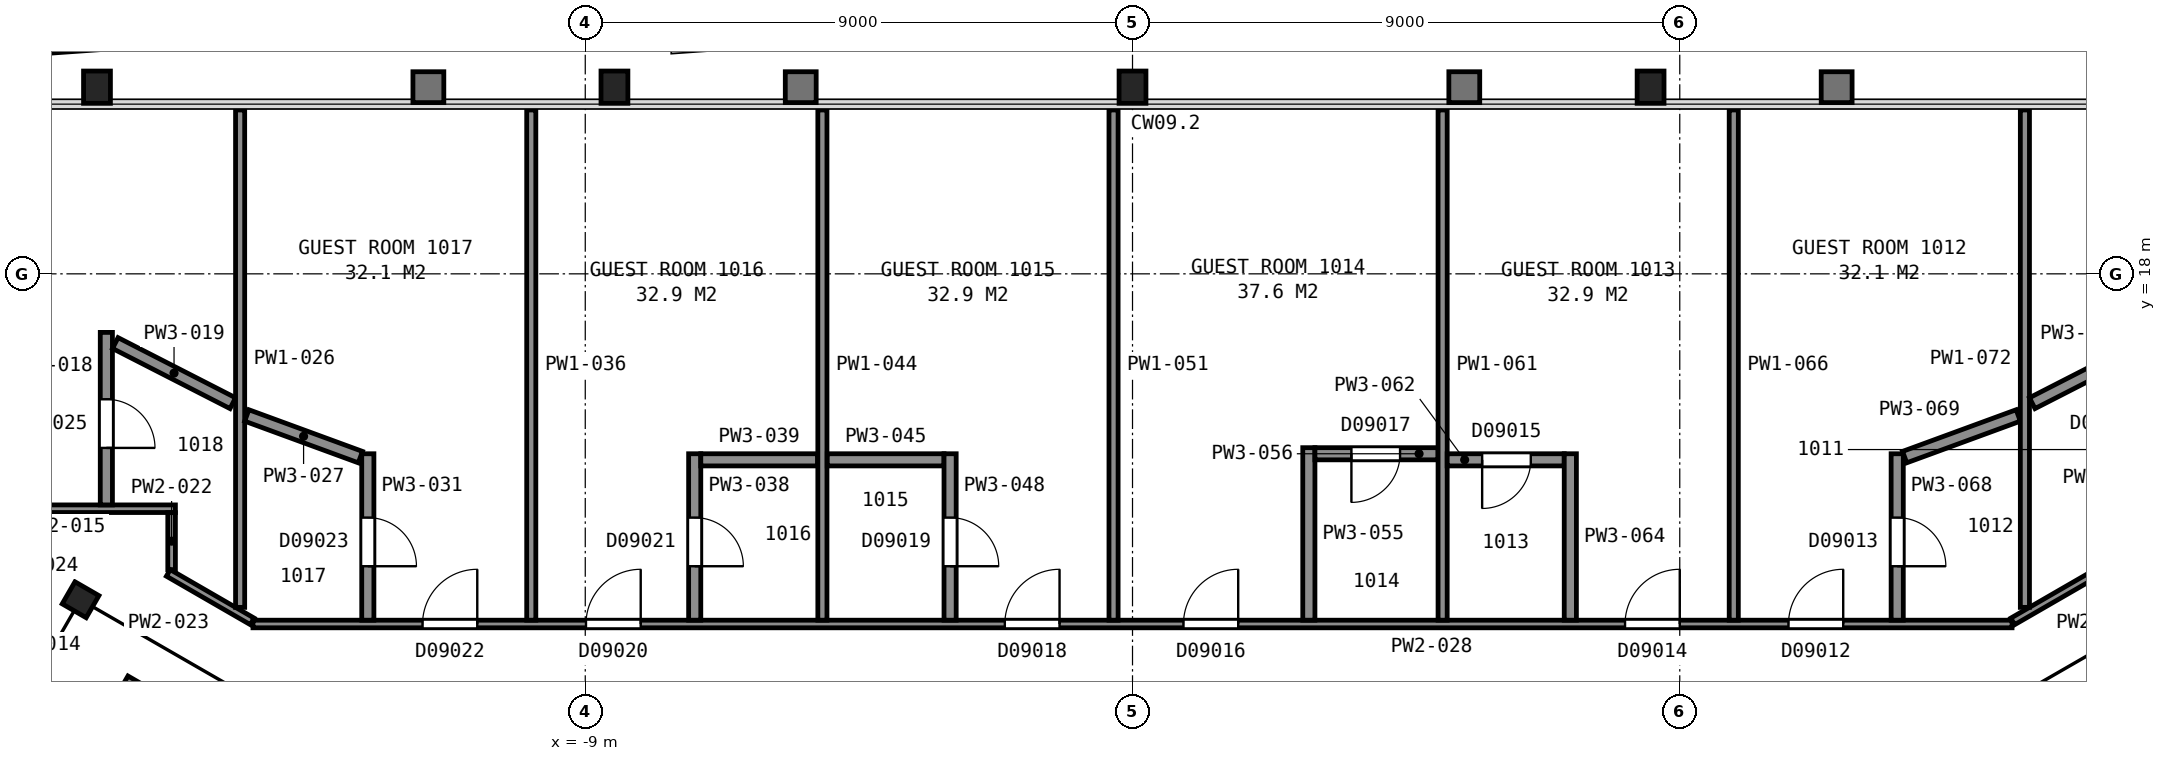
"""IFC4 building model, lengths in metres.
Left out: names, types, materials, properties, quantities, classifications, styles, units other than length and angle.
Written with IfcOpenShell. Run it as: python <this file> out.ifc"""

import sys

from ifc_helpers import new_model, si_unit, direction, frame, frame_2d, origin, origin_2d, place, context, subcontext, project, spatial, rectangle, i_section, extrude, element, fill, save


model = new_model("IFC4")
c1 = context("Model", 3, precision=1e-05, world=origin(), true_north=direction((0.0, 1.0)))
c2 = subcontext(c1, "Body", "Model", "MODEL_VIEW")
j1 = project(units=[si_unit("LENGTHUNIT", "METRE"), si_unit("PLANEANGLEUNIT", "RADIAN")], contexts=[c1])
p1 = place(None, origin())
s1 = spatial("IfcSite", under=j1, at=p1, CompositionType="ELEMENT")
p2 = place(p1, origin())
s2 = spatial("IfcBuilding", under=s1, at=p2, CompositionType="ELEMENT")
p3 = place(p2, frame((0.0, 0.0, 51.2)))
s3 = spatial("IfcBuildingStorey", under=s2, at=p3, CompositionType="ELEMENT", Elevation=51.2)
for number, where, z_axis, x_axis in (
    (1, (8.52, 21.07, 0.0), (0.0, 0.0, 1.0), (1.0, 0.0, 0.0)),
    (2, (0.0, 21.07, 0.0), (0.0, 0.0, 1.0), (1.0, 0.0, 0.0)),
    (3, (-8.52, 21.07, 0.0), (0.0, 0.0, 1.0), (1.0, 0.0, 0.0)),
    (4, (-17.03, 21.07, 0.0), (0.0, 0.0, 1.0), (1.0, 0.0, 0.0)),
):
    element("IfcColumn", number, at=place(p3, frame(where, z_axis=z_axis, x_axis=x_axis)), inside=s3, PredefinedType="COLUMN", context=c2, shape_type="SweptSolid", body=[
        extrude(i_section(OverallWidth=0.442, OverallDepth=0.531, WebThickness=0.066, FlangeThickness=0.106, FilletRadius=0.015, at=origin_2d()), origin(), (0.0, 0.0, 1.0), 3.6),
    ])
p4 = place(p3, frame((-17.3, 12.64, 0.0), z_axis=(0.0, 0.0, 1.0), x_axis=(0.5, 0.866025403784, 0.0)))
e5 = element("IfcColumn", 5, at=p4, inside=s3, PredefinedType="COLUMN", context=c2, shape_type="SweptSolid", body=[
    extrude(i_section(OverallWidth=0.419, OverallDepth=0.455, WebThickness=0.042, FlangeThickness=0.068, FilletRadius=0.015, at=origin_2d()), origin(), (0.0, 0.0, 1.0), 3.6),
])
for number, where, z_axis, x_axis in (
    (6, (6.178, 5.299, 0.0), (0.0, 0.0, 1.0), (0.866, 0.5, 0.0)),
    (7, (-6.178, 5.299, 0.0), (0.0, 0.0, 1.0), (-0.866, 0.5, 0.0)),
):
    element("IfcWall", number, at=place(p3, frame(where, z_axis=z_axis, x_axis=x_axis)), inside=s3, PredefinedType="PARTITIONING", context=c2, shape_type="SweptSolid", body=[
        extrude(rectangle(XDim=12.0, YDim=0.2, at=frame_2d((6.0, 0.0))), origin(), (0.0, 0.0, 1.0), 3.35),
    ])
p5 = place(p3, frame((-18.86, 14.137, 0.0), z_axis=(0.0, 0.0, 1.0), x_axis=(1.0, 0.0, 0.0)))
e8 = element("IfcWall", 8, at=p5, inside=s3, PredefinedType="PARTITIONING", context=c2, shape_type="SweptSolid", body=[
    extrude(rectangle(XDim=3.119, YDim=0.125, at=frame_2d((1.56, 0.0))), origin(), (0.0, 0.0, 1.0), 2.613),
])
p6 = place(p3, frame((-16.876, 17.037, 0.0), z_axis=(0.0, 0.0, 1.0), x_axis=(0.0, -1.0, 0.0)))
e9 = element("IfcWall", 9, at=p6, inside=s3, PredefinedType="PARTITIONING", context=c2, shape_type="SweptSolid", body=[
    extrude(rectangle(XDim=2.838, YDim=0.2, at=frame_2d((1.419, 0.0))), origin(), (0.0, 0.0, 1.0), 2.613),
])
p7 = place(p6, frame((1.1, 0.0, 0.0)))
e10 = element("IfcOpeningElement", 10, at=p7, cuts=e9, PredefinedType="OPENING", context=c2, shape_type="SweptSolid", body=[
    extrude(rectangle(XDim=0.8, YDim=2.1, at=frame_2d((0.4, 1.05))), frame((0.0, 0.11, 0.0), z_axis=(0.0, -1.0, 0.0), x_axis=(1.0, 0.0, 0.0)), (0.0, 0.0, 1.0), 0.22),
])
p8 = place(p3, frame((-16.729, 16.862, 0.0), z_axis=(0.0, 0.0, 1.0), x_axis=(0.890181338078, -0.455606392995, 0.0)))
e11 = element("IfcWall", 11, at=p8, inside=s3, PredefinedType="PARTITIONING", context=c2, shape_type="SweptSolid", body=[
    extrude(rectangle(XDim=2.171, YDim=0.2, at=frame_2d((1.085, 0.0))), origin(), (0.0, 0.0, 1.0), 2.613),
])
p9 = place(p3, frame((-15.803, 13.135, 0.0), z_axis=(0.0, 0.0, 1.0), x_axis=(0.0, 1.0, 0.0)))
e12 = element("IfcWall", 12, at=p9, inside=s3, PredefinedType="PARTITIONING", context=c2, shape_type="SweptSolid", body=[
    extrude(rectangle(XDim=0.937, YDim=0.125, at=frame_2d((0.469, 0.0))), origin(), (0.0, 0.0, 1.0), 2.613),
])
p10 = place(p3, frame((-15.857, 13.081, 0.0), z_axis=(0.0, 0.0, 1.0), x_axis=(0.865974057503, -0.500088923824, 0.0)))
e13 = element("IfcWall", 13, at=p10, inside=s3, PredefinedType="PARTITIONING", context=c2, shape_type="SweptSolid", body=[
    extrude(rectangle(XDim=1.595, YDim=0.125, at=frame_2d((0.798, 0.0))), origin(), (0.0, 0.0, 1.0), 2.613),
])
p11 = place(p3, frame((-14.676, 12.514, 0.0), z_axis=(0.0, 0.0, 1.0), x_axis=(0.0, 1.0, 0.0)))
e14 = element("IfcWall", 14, at=p11, inside=s3, PredefinedType="PARTITIONING", context=c2, shape_type="SweptSolid", body=[
    extrude(rectangle(XDim=8.181, YDim=0.15, at=frame_2d((4.09, 0.0))), origin(), (0.0, 0.0, 1.0), 2.613),
])
p12 = place(p3, frame((-14.567, 15.671, 0.0), z_axis=(0.0, 0.0, 1.0), x_axis=(0.938894816734, -0.344204188105, 0.0)))
e15 = element("IfcWall", 15, at=p12, inside=s3, PredefinedType="PARTITIONING", context=c2, shape_type="SweptSolid", body=[
    extrude(rectangle(XDim=1.99, YDim=0.2, at=frame_2d((0.995, 0.0))), origin(), (0.0, 0.0, 1.0), 2.613),
])
p13 = place(p3, frame((-14.465, 12.241, 0.0), z_axis=(0.0, 0.0, 1.0), x_axis=(1.0, 0.0, 0.0)))
e16 = element("IfcWall", 16, at=p13, inside=s3, PredefinedType="PARTITIONING", context=c2, shape_type="SweptSolid", body=[
    extrude(rectangle(XDim=28.929, YDim=0.125, at=frame_2d((14.465, 0.0))), origin(), (0.0, 0.0, 1.0), 2.613),
])
p14 = place(p13, frame((25.252, 0.0, 0.0)))
e17 = element("IfcOpeningElement", 17, at=p14, cuts=e16, PredefinedType="OPENING", context=c2, shape_type="SweptSolid", body=[
    extrude(rectangle(XDim=0.9, YDim=2.1, at=frame_2d((0.45, 1.05))), frame((0.0, 0.073, 0.0), z_axis=(0.0, -1.0, 0.0), x_axis=(1.0, 0.0, 0.0)), (0.0, 0.0, 1.0), 0.145),
])
p15 = place(p13, frame((22.564, 0.0, 0.0)))
e18 = element("IfcOpeningElement", 18, at=p15, cuts=e16, PredefinedType="OPENING", context=c2, shape_type="SweptSolid", body=[
    extrude(rectangle(XDim=0.9, YDim=2.1, at=frame_2d((0.45, 1.05))), frame((0.0, 0.073, 0.0), z_axis=(0.0, -1.0, 0.0), x_axis=(1.0, 0.0, 0.0)), (0.0, 0.0, 1.0), 0.145),
])
p16 = place(p13, frame((15.302, 0.0, 0.0)))
e19 = element("IfcOpeningElement", 19, at=p16, cuts=e16, PredefinedType="OPENING", context=c2, shape_type="SweptSolid", body=[
    extrude(rectangle(XDim=0.9, YDim=2.1, at=frame_2d((0.45, 1.05))), frame((0.0, 0.073, 0.0), z_axis=(0.0, -1.0, 0.0), x_axis=(1.0, 0.0, 0.0)), (0.0, 0.0, 1.0), 0.145),
])
p17 = place(p13, frame((12.365, 0.0, 0.0)))
e20 = element("IfcOpeningElement", 20, at=p17, cuts=e16, PredefinedType="OPENING", context=c2, shape_type="SweptSolid", body=[
    extrude(rectangle(XDim=0.9, YDim=2.1, at=frame_2d((0.45, 1.05))), frame((0.0, 0.073, 0.0), z_axis=(0.0, -1.0, 0.0), x_axis=(1.0, 0.0, 0.0)), (0.0, 0.0, 1.0), 0.145),
])
p18 = place(p13, frame((5.477, 0.0, 0.0)))
e21 = element("IfcOpeningElement", 21, at=p18, cuts=e16, PredefinedType="OPENING", context=c2, shape_type="SweptSolid", body=[
    extrude(rectangle(XDim=0.9, YDim=2.1, at=frame_2d((0.45, 1.05))), frame((0.0, 0.073, 0.0), z_axis=(0.0, -1.0, 0.0), x_axis=(1.0, 0.0, 0.0)), (0.0, 0.0, 1.0), 0.145),
])
p19 = place(p13, frame((2.789, 0.0, 0.0)))
e22 = element("IfcOpeningElement", 22, at=p19, cuts=e16, PredefinedType="OPENING", context=c2, shape_type="SweptSolid", body=[
    extrude(rectangle(XDim=0.9, YDim=2.1, at=frame_2d((0.45, 1.05))), frame((0.0, 0.073, 0.0), z_axis=(0.0, -1.0, 0.0), x_axis=(1.0, 0.0, 0.0)), (0.0, 0.0, 1.0), 0.145),
])
p20 = place(p3, frame((-12.576, 12.303, 0.0), z_axis=(0.0, 0.0, 1.0), x_axis=(0.0, 1.0, 0.0)))
e23 = element("IfcWall", 23, at=p20, inside=s3, PredefinedType="PARTITIONING", context=c2, shape_type="SweptSolid", body=[
    extrude(rectangle(XDim=2.738, YDim=0.2, at=frame_2d((1.369, 0.0))), origin(), (0.0, 0.0, 1.0), 2.613),
])
p21 = place(p20, frame((0.887, 0.0, 0.0)))
e24 = element("IfcOpeningElement", 24, at=p21, cuts=e23, PredefinedType="OPENING", context=c2, shape_type="SweptSolid", body=[
    extrude(rectangle(XDim=0.8, YDim=2.1, at=frame_2d((0.4, 1.05))), frame((0.0, 0.11, 0.0), z_axis=(0.0, -1.0, 0.0), x_axis=(1.0, 0.0, 0.0)), (0.0, 0.0, 1.0), 0.22),
])
p22 = place(p3, frame((-9.888, 12.303, 0.0), z_axis=(0.0, 0.0, 1.0), x_axis=(0.0, 1.0, 0.0)))
e25 = element("IfcWall", 25, at=p22, inside=s3, PredefinedType="PARTITIONING", context=c2, shape_type="SweptSolid", body=[
    extrude(rectangle(XDim=8.392, YDim=0.15, at=frame_2d((4.196, 0.0))), origin(), (0.0, 0.0, 1.0), 2.613),
])
p23 = place(p3, frame((-7.2, 15.041, 0.0), z_axis=(0.0, 0.0, 1.0), x_axis=(0.0, -1.0, 0.0)))
e26 = element("IfcWall", 26, at=p23, inside=s3, PredefinedType="PARTITIONING", context=c2, shape_type="SweptSolid", body=[
    extrude(rectangle(XDim=2.738, YDim=0.2, at=frame_2d((1.369, 0.0))), origin(), (0.0, 0.0, 1.0), 2.613),
])
p24 = place(p23, frame((1.05, 0.0, 0.0)))
e27 = element("IfcOpeningElement", 27, at=p24, cuts=e26, PredefinedType="OPENING", context=c2, shape_type="SweptSolid", body=[
    extrude(rectangle(XDim=0.8, YDim=2.1, at=frame_2d((0.4, 1.05))), frame((0.0, 0.11, 0.0), z_axis=(0.0, -1.0, 0.0), x_axis=(1.0, 0.0, 0.0)), (0.0, 0.0, 1.0), 0.22),
])
p25 = place(p3, frame((-7.1, 14.941, 0.0), z_axis=(0.0, 0.0, 1.0), x_axis=(1.0, 0.0, 0.0)))
e28 = element("IfcWall", 28, at=p25, inside=s3, PredefinedType="PARTITIONING", context=c2, shape_type="SweptSolid", body=[
    extrude(rectangle(XDim=1.92, YDim=0.2, at=frame_2d((0.96, 0.0))), origin(), (0.0, 0.0, 1.0), 2.613),
])
p26 = place(p3, frame((-5.1, 12.303, 0.0), z_axis=(0.0, 0.0, 1.0), x_axis=(0.0, 1.0, 0.0)))
e29 = element("IfcWall", 29, at=p26, inside=s3, PredefinedType="PARTITIONING", context=c2, shape_type="SweptSolid", body=[
    extrude(rectangle(XDim=8.392, YDim=0.15, at=frame_2d((4.196, 0.0))), origin(), (0.0, 0.0, 1.0), 2.613),
])
p27 = place(p3, frame((-5.02, 14.941, 0.0), z_axis=(0.0, 0.0, 1.0), x_axis=(1.0, 0.0, 0.0)))
e30 = element("IfcWall", 30, at=p27, inside=s3, PredefinedType="PARTITIONING", context=c2, shape_type="SweptSolid", body=[
    extrude(rectangle(XDim=1.92, YDim=0.2, at=frame_2d((0.96, 0.0))), origin(), (0.0, 0.0, 1.0), 2.613),
])
p28 = place(p3, frame((-3.0, 12.303, 0.0), z_axis=(0.0, 0.0, 1.0), x_axis=(0.0, 1.0, 0.0)))
e31 = element("IfcWall", 31, at=p28, inside=s3, PredefinedType="PARTITIONING", context=c2, shape_type="SweptSolid", body=[
    extrude(rectangle(XDim=2.738, YDim=0.2, at=frame_2d((1.369, 0.0))), origin(), (0.0, 0.0, 1.0), 2.613),
])
p29 = place(p28, frame((0.887, 0.0, 0.0)))
e32 = element("IfcOpeningElement", 32, at=p29, cuts=e31, PredefinedType="OPENING", context=c2, shape_type="SweptSolid", body=[
    extrude(rectangle(XDim=0.8, YDim=2.1, at=frame_2d((0.4, 1.05))), frame((0.0, 0.11, 0.0), z_axis=(0.0, -1.0, 0.0), x_axis=(1.0, 0.0, 0.0)), (0.0, 0.0, 1.0), 0.22),
])
p30 = place(p3, frame((-0.312, 12.303, 0.0), z_axis=(0.0, 0.0, 1.0), x_axis=(0.0, 1.0, 0.0)))
e33 = element("IfcWall", 33, at=p30, inside=s3, PredefinedType="PARTITIONING", context=c2, shape_type="SweptSolid", body=[
    extrude(rectangle(XDim=8.392, YDim=0.15, at=frame_2d((4.196, 0.0))), origin(), (0.0, 0.0, 1.0), 2.613),
])
p31 = place(p3, frame((2.9, 12.303, 0.0), z_axis=(0.0, 0.0, 1.0), x_axis=(0.0, 1.0, 0.0)))
e34 = element("IfcWall", 34, at=p31, inside=s3, PredefinedType="PARTITIONING", context=c2, shape_type="SweptSolid", body=[
    extrude(rectangle(XDim=2.838, YDim=0.2, at=frame_2d((1.419, 0.0))), origin(), (0.0, 0.0, 1.0), 2.613),
])
p32 = place(p3, frame((5.025, 15.041, 0.0), z_axis=(0.0, 0.0, 1.0), x_axis=(-1.0, 0.0, 0.0)))
e35 = element("IfcWall", 35, at=p32, inside=s3, PredefinedType="PARTITIONING", context=c2, shape_type="SweptSolid", body=[
    extrude(rectangle(XDim=2.025, YDim=0.2, at=frame_2d((1.012, 0.0))), origin(), (0.0, 0.0, 1.0), 2.613),
])
p33 = place(p32, frame((0.625, 0.0, 0.0)))
e36 = element("IfcOpeningElement", 36, at=p33, cuts=e35, PredefinedType="OPENING", context=c2, shape_type="SweptSolid", body=[
    extrude(rectangle(XDim=0.8, YDim=2.1, at=frame_2d((0.4, 1.05))), frame((0.0, 0.11, 0.0), z_axis=(0.0, -1.0, 0.0), x_axis=(1.0, 0.0, 0.0)), (0.0, 0.0, 1.0), 0.22),
])
p34 = place(p3, frame((5.1, 12.303, 0.0), z_axis=(0.0, 0.0, 1.0), x_axis=(0.0, 1.0, 0.0)))
e37 = element("IfcWall", 37, at=p34, inside=s3, PredefinedType="PARTITIONING", context=c2, shape_type="SweptSolid", body=[
    extrude(rectangle(XDim=8.392, YDim=0.15, at=frame_2d((4.196, 0.0))), origin(), (0.0, 0.0, 1.0), 2.613),
])
p35 = place(p3, frame((7.1, 14.941, 0.0), z_axis=(0.0, 0.0, 1.0), x_axis=(-1.0, 0.0, 0.0)))
e38 = element("IfcWall", 38, at=p35, inside=s3, PredefinedType="PARTITIONING", context=c2, shape_type="SweptSolid", body=[
    extrude(rectangle(XDim=1.925, YDim=0.2, at=frame_2d((0.962, 0.0))), origin(), (0.0, 0.0, 1.0), 2.613),
])
p36 = place(p35, frame((0.55, 0.0, 0.0)))
e39 = element("IfcOpeningElement", 39, at=p36, cuts=e38, PredefinedType="OPENING", context=c2, shape_type="SweptSolid", body=[
    extrude(rectangle(XDim=0.8, YDim=2.1, at=frame_2d((0.4, 1.05))), frame((0.0, 0.11, 0.0), z_axis=(0.0, -1.0, 0.0), x_axis=(1.0, 0.0, 0.0)), (0.0, 0.0, 1.0), 0.22),
])
p37 = place(p3, frame((7.2, 12.303, 0.0), z_axis=(0.0, 0.0, 1.0), x_axis=(0.0, 1.0, 0.0)))
e40 = element("IfcWall", 40, at=p37, inside=s3, PredefinedType="PARTITIONING", context=c2, shape_type="SweptSolid", body=[
    extrude(rectangle(XDim=2.738, YDim=0.2, at=frame_2d((1.369, 0.0))), origin(), (0.0, 0.0, 1.0), 2.613),
])
p38 = place(p3, frame((9.888, 12.303, 0.0), z_axis=(0.0, 0.0, 1.0), x_axis=(0.0, 1.0, 0.0)))
e41 = element("IfcWall", 41, at=p38, inside=s3, PredefinedType="PARTITIONING", context=c2, shape_type="SweptSolid", body=[
    extrude(rectangle(XDim=8.392, YDim=0.15, at=frame_2d((4.196, 0.0))), origin(), (0.0, 0.0, 1.0), 2.613),
])
p39 = place(p3, frame((12.576, 15.041, 0.0), z_axis=(0.0, 0.0, 1.0), x_axis=(0.0, -1.0, 0.0)))
e42 = element("IfcWall", 42, at=p39, inside=s3, PredefinedType="PARTITIONING", context=c2, shape_type="SweptSolid", body=[
    extrude(rectangle(XDim=2.738, YDim=0.2, at=frame_2d((1.369, 0.0))), origin(), (0.0, 0.0, 1.0), 2.613),
])
p40 = place(p39, frame((1.05, 0.0, 0.0)))
e43 = element("IfcOpeningElement", 43, at=p40, cuts=e42, PredefinedType="OPENING", context=c2, shape_type="SweptSolid", body=[
    extrude(rectangle(XDim=0.8, YDim=2.1, at=frame_2d((0.4, 1.05))), frame((0.0, 0.11, 0.0), z_axis=(0.0, -1.0, 0.0), x_axis=(1.0, 0.0, 0.0)), (0.0, 0.0, 1.0), 0.22),
])
p41 = place(p3, frame((12.698, 14.986, 0.0), z_axis=(0.0, 0.0, 1.0), x_axis=(0.938894816734, 0.344204188105, 0.0)))
e44 = element("IfcWall", 44, at=p41, inside=s3, PredefinedType="PARTITIONING", context=c2, shape_type="SweptSolid", body=[
    extrude(rectangle(XDim=1.99, YDim=0.2, at=frame_2d((0.995, 0.0))), origin(), (0.0, 0.0, 1.0), 2.613),
])
p42 = place(p3, frame((14.476, 12.283, 0.0), z_axis=(0.0, 0.0, 1.0), x_axis=(0.865974057503, 0.500088923824, 0.0)))
e45 = element("IfcWall", 45, at=p42, inside=s3, PredefinedType="PARTITIONING", context=c2, shape_type="SweptSolid", body=[
    extrude(rectangle(XDim=1.595, YDim=0.125, at=frame_2d((0.798, 0.0))), origin(), (0.0, 0.0, 1.0), 2.613),
])
p43 = place(p3, frame((14.676, 12.514, 0.0), z_axis=(0.0, 0.0, 1.0), x_axis=(0.0, 1.0, 0.0)))
e46 = element("IfcWall", 46, at=p43, inside=s3, PredefinedType="PARTITIONING", context=c2, shape_type="SweptSolid", body=[
    extrude(rectangle(XDim=8.181, YDim=0.15, at=frame_2d((4.09, 0.0))), origin(), (0.0, 0.0, 1.0), 2.613),
])
p44 = place(p3, frame((14.797, 15.873, 0.0), z_axis=(0.0, 0.0, 1.0), x_axis=(0.890181338078, 0.455606392995, 0.0)))
e47 = element("IfcWall", 47, at=p44, inside=s3, PredefinedType="PARTITIONING", context=c2, shape_type="SweptSolid", body=[
    extrude(rectangle(XDim=2.171, YDim=0.2, at=frame_2d((1.085, 0.0))), origin(), (0.0, 0.0, 1.0), 2.613),
])
p45 = place(p7, origin())
e48 = element("IfcDoor", 48, at=p45, inside=s3, OperationType="SINGLE_SWING_RIGHT", PredefinedType="DOOR", context=c2, shape_type="SweptSolid", body=[
    extrude(rectangle(XDim=0.8, YDim=2.1, at=frame_2d((0.4, 1.05))), frame((0.0, 0.025, 0.0), z_axis=(0.0, -1.0, 0.0), x_axis=(1.0, 0.0, 0.0)), (0.0, 0.0, 1.0), 0.05),
])
fill(e10, e48)
p46 = place(p14, origin())
e49 = element("IfcDoor", 49, at=p46, inside=s3, OperationType="SINGLE_SWING_RIGHT", PredefinedType="DOOR", context=c2, shape_type="SweptSolid", body=[
    extrude(rectangle(XDim=0.9, YDim=2.1, at=frame_2d((0.45, 1.05))), frame((0.0, 0.025, 0.0), z_axis=(0.0, -1.0, 0.0), x_axis=(1.0, 0.0, 0.0)), (0.0, 0.0, 1.0), 0.05),
])
fill(e17, e49)
p47 = place(p15, origin())
e50 = element("IfcDoor", 50, at=p47, inside=s3, OperationType="SINGLE_SWING_RIGHT", PredefinedType="DOOR", context=c2, shape_type="SweptSolid", body=[
    extrude(rectangle(XDim=0.9, YDim=2.1, at=frame_2d((0.45, 1.05))), frame((0.0, 0.025, 0.0), z_axis=(0.0, -1.0, 0.0), x_axis=(1.0, 0.0, 0.0)), (0.0, 0.0, 1.0), 0.05),
])
fill(e18, e50)
p48 = place(p16, origin())
e51 = element("IfcDoor", 51, at=p48, inside=s3, OperationType="SINGLE_SWING_RIGHT", PredefinedType="DOOR", context=c2, shape_type="SweptSolid", body=[
    extrude(rectangle(XDim=0.9, YDim=2.1, at=frame_2d((0.45, 1.05))), frame((0.0, 0.025, 0.0), z_axis=(0.0, -1.0, 0.0), x_axis=(1.0, 0.0, 0.0)), (0.0, 0.0, 1.0), 0.05),
])
fill(e19, e51)
p49 = place(p17, origin())
e52 = element("IfcDoor", 52, at=p49, inside=s3, OperationType="SINGLE_SWING_RIGHT", PredefinedType="DOOR", context=c2, shape_type="SweptSolid", body=[
    extrude(rectangle(XDim=0.9, YDim=2.1, at=frame_2d((0.45, 1.05))), frame((0.0, 0.025, 0.0), z_axis=(0.0, -1.0, 0.0), x_axis=(1.0, 0.0, 0.0)), (0.0, 0.0, 1.0), 0.05),
])
fill(e20, e52)
p50 = place(p18, origin())
e53 = element("IfcDoor", 53, at=p50, inside=s3, OperationType="SINGLE_SWING_RIGHT", PredefinedType="DOOR", context=c2, shape_type="SweptSolid", body=[
    extrude(rectangle(XDim=0.9, YDim=2.1, at=frame_2d((0.45, 1.05))), frame((0.0, 0.025, 0.0), z_axis=(0.0, -1.0, 0.0), x_axis=(1.0, 0.0, 0.0)), (0.0, 0.0, 1.0), 0.05),
])
fill(e21, e53)
p51 = place(p19, origin())
e54 = element("IfcDoor", 54, at=p51, inside=s3, OperationType="SINGLE_SWING_RIGHT", PredefinedType="DOOR", context=c2, shape_type="SweptSolid", body=[
    extrude(rectangle(XDim=0.9, YDim=2.1, at=frame_2d((0.45, 1.05))), frame((0.0, 0.025, 0.0), z_axis=(0.0, -1.0, 0.0), x_axis=(1.0, 0.0, 0.0)), (0.0, 0.0, 1.0), 0.05),
])
fill(e22, e54)
p52 = place(p21, origin())
e55 = element("IfcDoor", 55, at=p52, inside=s3, OperationType="SINGLE_SWING_LEFT", PredefinedType="DOOR", context=c2, shape_type="SweptSolid", body=[
    extrude(rectangle(XDim=0.8, YDim=2.1, at=frame_2d((0.4, 1.05))), frame((0.0, 0.025, 0.0), z_axis=(0.0, -1.0, 0.0), x_axis=(1.0, 0.0, 0.0)), (0.0, 0.0, 1.0), 0.05),
])
fill(e24, e55)
p53 = place(p24, origin())
e56 = element("IfcDoor", 56, at=p53, inside=s3, OperationType="SINGLE_SWING_RIGHT", PredefinedType="DOOR", context=c2, shape_type="SweptSolid", body=[
    extrude(rectangle(XDim=0.8, YDim=2.1, at=frame_2d((0.4, 1.05))), frame((0.0, 0.025, 0.0), z_axis=(0.0, -1.0, 0.0), x_axis=(1.0, 0.0, 0.0)), (0.0, 0.0, 1.0), 0.05),
])
fill(e27, e56)
p54 = place(p29, origin())
e57 = element("IfcDoor", 57, at=p54, inside=s3, OperationType="SINGLE_SWING_LEFT", PredefinedType="DOOR", context=c2, shape_type="SweptSolid", body=[
    extrude(rectangle(XDim=0.8, YDim=2.1, at=frame_2d((0.4, 1.05))), frame((0.0, 0.025, 0.0), z_axis=(0.0, -1.0, 0.0), x_axis=(1.0, 0.0, 0.0)), (0.0, 0.0, 1.0), 0.05),
])
fill(e32, e57)
p55 = place(p33, origin())
e58 = element("IfcDoor", 58, at=p55, inside=s3, OperationType="SINGLE_SWING_RIGHT", PredefinedType="DOOR", context=c2, shape_type="SweptSolid", body=[
    extrude(rectangle(XDim=0.8, YDim=2.1, at=frame_2d((0.4, 1.05))), frame((0.0, 0.025, 0.0), z_axis=(0.0, -1.0, 0.0), x_axis=(1.0, 0.0, 0.0)), (0.0, 0.0, 1.0), 0.05),
])
fill(e36, e58)
p56 = place(p36, origin())
e59 = element("IfcDoor", 59, at=p56, inside=s3, OperationType="SINGLE_SWING_RIGHT", PredefinedType="DOOR", context=c2, shape_type="SweptSolid", body=[
    extrude(rectangle(XDim=0.8, YDim=2.1, at=frame_2d((0.4, 1.05))), frame((0.0, 0.025, 0.0), z_axis=(0.0, -1.0, 0.0), x_axis=(1.0, 0.0, 0.0)), (0.0, 0.0, 1.0), 0.05),
])
fill(e39, e59)
p57 = place(p40, origin())
e60 = element("IfcDoor", 60, at=p57, inside=s3, OperationType="SINGLE_SWING_RIGHT", PredefinedType="DOOR", context=c2, shape_type="SweptSolid", body=[
    extrude(rectangle(XDim=0.8, YDim=2.1, at=frame_2d((0.4, 1.05))), frame((0.0, 0.025, 0.0), z_axis=(0.0, -1.0, 0.0), x_axis=(1.0, 0.0, 0.0)), (0.0, 0.0, 1.0), 0.05),
])
fill(e43, e60)
save(model, sys.argv[1])
